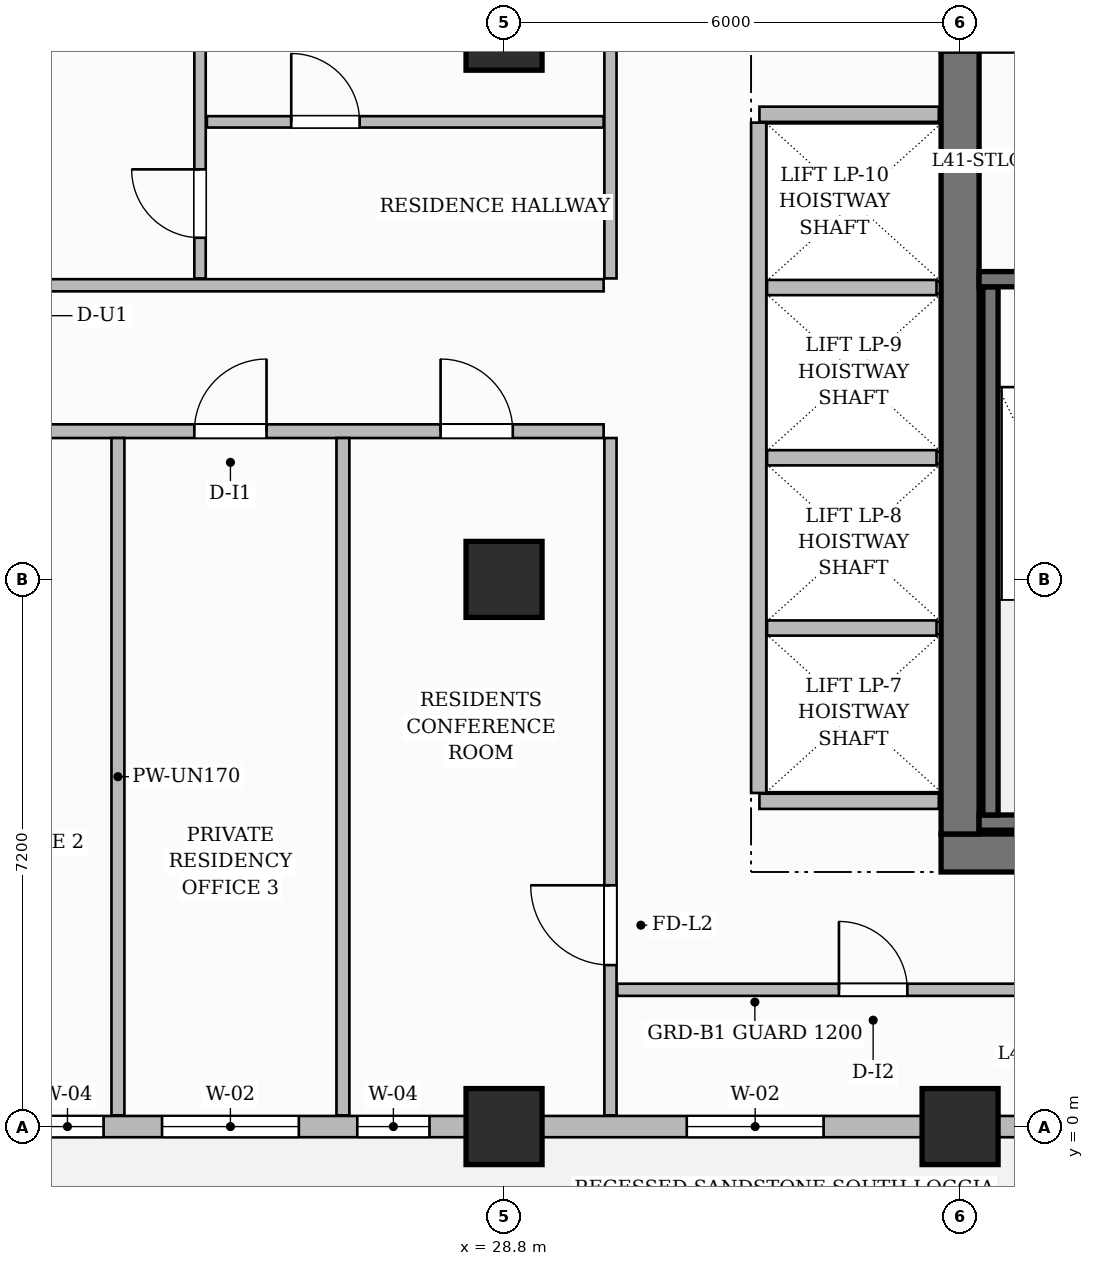
"""IFC4 building model, lengths in metres.
Left out: names, types, materials, properties, quantities, classifications, styles, units other than length and angle.
Written with IfcOpenShell. Run it as: python <this file> out.ifc"""

import sys

from ifc_helpers import new_model, si_unit, direction, frame, frame_2d, origin, origin_2d, place, context, subcontext, project, spatial, rectangle, extrude, source, transform, mapped, element, fill, save


model = new_model("IFC4")
c1 = context("Model", 3, precision=1e-05, world=origin(), true_north=direction((0.0, 1.0)))
c2 = subcontext(c1, "Body", "Model", "MODEL_VIEW")
j1 = project(units=[si_unit("LENGTHUNIT", "METRE"), si_unit("PLANEANGLEUNIT", "RADIAN")], contexts=[c1])
p1 = place(None, origin())
s1 = spatial("IfcSite", under=j1, at=p1, CompositionType="ELEMENT")
p2 = place(p1, origin())
s2 = spatial("IfcBuilding", under=s1, at=p2, CompositionType="ELEMENT")
p3 = place(p2, frame((0.0, 0.0, 165.7)))
s3 = spatial("IfcBuildingStorey", under=s2, at=p3, CompositionType="ELEMENT", Elevation=165.7)
p4 = place(p3, frame((34.55, 3.6, 0.0), z_axis=(0.0, 0.0, 1.0), x_axis=(1.0, 0.0, 0.0)))
e1 = element("IfcWall", 1, at=p4, inside=s3, PredefinedType="SHEAR", context=c2, shape_type="SweptSolid", body=[
    extrude(rectangle(XDim=15.5, YDim=0.5, at=frame_2d((7.75, 0.0))), origin(), (0.0, 0.0, 1.0), 3.85),
])
p5 = place(p4, frame((4.8, 0.0, 0.0)))
e2 = element("IfcOpeningElement", 2, at=p5, cuts=e1, PredefinedType="OPENING", context=c2, shape_type="SweptSolid", body=[
    extrude(rectangle(XDim=0.9, YDim=2.1, at=frame_2d((0.45, 1.05))), frame((0.0, 0.26, 0.0), z_axis=(0.0, -1.0, 0.0), x_axis=(1.0, 0.0, 0.0)), (0.0, 0.0, 1.0), 0.52),
])
p6 = place(p4, frame((7.22, 0.0, 0.0)))
e3 = element("IfcOpeningElement", 3, at=p6, cuts=e1, PredefinedType="OPENING", context=c2, shape_type="SweptSolid", body=[
    extrude(rectangle(XDim=0.9, YDim=2.1, at=frame_2d((0.45, 1.05))), frame((0.0, 0.26, 0.0), z_axis=(0.0, -1.0, 0.0), x_axis=(1.0, 0.0, 0.0)), (0.0, 0.0, 1.0), 0.52),
])
p7 = place(p3, frame((34.8, 3.85, 0.0), z_axis=(0.0, 0.0, 1.0), x_axis=(0.0, 1.0, 0.0)))
e4 = element("IfcWall", 4, at=p7, inside=s3, PredefinedType="SHEAR", context=c2, shape_type="SweptSolid", body=[
    extrude(rectangle(XDim=10.3, YDim=0.5, at=frame_2d((5.15, 0.0))), origin(), (0.0, 0.0, 1.0), 3.85),
])
m1 = source(origin(), c2, "Body", "SweptSolid", [
    extrude(rectangle(XDim=1.0, YDim=1.0, at=origin_2d()), origin(), (0.0, 0.0, 1.0), 3.85),
])
for number, where, z_axis, x_axis in (
    (5, (28.8, 0.0, 0.0), (0.0, 0.0, 1.0), (1.0, 0.0, 0.0)),
    (6, (28.8, 7.2, 0.0), (0.0, 0.0, 1.0), (1.0, 0.0, 0.0)),
    (7, (28.8, 14.4, 0.0), (0.0, 0.0, 1.0), (1.0, 0.0, 0.0)),
    (8, (34.8, 0.0, 0.0), (0.0, 0.0, 1.0), (1.0, 0.0, 0.0)),
):
    element("IfcColumn", number, at=place(p3, frame(where, z_axis=z_axis, x_axis=x_axis)), inside=s3, PredefinedType="COLUMN", context=c2, shape_type="MappedRepresentation", body=[
        mapped(m1, transform((0.0, 0.0, 0.0), scale=1.0)),
    ])
p8 = place(p3, frame((35.05, 4.0, 0.0), z_axis=(0.0, 0.0, 1.0), x_axis=(1.0, 0.0, 0.0)))
e9 = element("IfcWall", 9, at=p8, inside=s3, PredefinedType="SHEAR", context=c2, shape_type="SweptSolid", body=[
    extrude(rectangle(XDim=3.19, YDim=0.2, at=frame_2d((1.595, 0.0))), origin(), (0.0, 0.0, 1.0), 3.85),
])
p9 = place(p3, frame((35.2, 4.1, 0.0), z_axis=(0.0, 0.0, 1.0), x_axis=(0.0, 1.0, 0.0)))
e10 = element("IfcWall", 10, at=p9, inside=s3, PredefinedType="SHEAR", context=c2, shape_type="SweptSolid", body=[
    extrude(rectangle(XDim=6.95, YDim=0.2, at=frame_2d((3.475, 0.0))), origin(), (0.0, 0.0, 1.0), 3.85),
])
p10 = place(p3, frame((35.05, 11.15, 0.0), z_axis=(0.0, 0.0, 1.0), x_axis=(1.0, 0.0, 0.0)))
e11 = element("IfcWall", 11, at=p10, inside=s3, PredefinedType="SHEAR", context=c2, shape_type="SweptSolid", body=[
    extrude(rectangle(XDim=3.19, YDim=0.2, at=frame_2d((1.595, 0.0))), origin(), (0.0, 0.0, 1.0), 3.85),
])
p11 = place(p10, frame((1.095, 0.0, 0.0)))
e12 = element("IfcOpeningElement", 12, at=p11, cuts=e11, PredefinedType="OPENING", context=c2, shape_type="SweptSolid", body=[
    extrude(rectangle(XDim=1.05, YDim=2.2, at=frame_2d((0.525, 1.1))), frame((0.0, 0.11, 0.0), z_axis=(0.0, -1.0, 0.0), x_axis=(1.0, 0.0, 0.0)), (0.0, 0.0, 1.0), 0.22),
])
for number, where, z_axis, x_axis in (
    (13, (32.16, 4.28, 0.0), (0.0, 0.0, 1.0), (1.0, 0.0, 0.0)),
    (14, (32.16, 13.32, 0.0), (0.0, 0.0, 1.0), (1.0, 0.0, 0.0)),
):
    element("IfcWall", number, at=place(p3, frame(where, z_axis=z_axis, x_axis=x_axis)), inside=s3, PredefinedType="PARTITIONING", context=c2, shape_type="SweptSolid", body=[
        extrude(rectangle(XDim=2.36, YDim=0.2, at=frame_2d((1.18, 0.0))), origin(), (0.0, 0.0, 1.0), 3.6),
    ])
p12 = place(p3, frame((32.15, 4.39, 0.0), z_axis=(0.0, 0.0, 1.0), x_axis=(0.0, 1.0, 0.0)))
e15 = element("IfcWall", 15, at=p12, inside=s3, PredefinedType="PARTITIONING", context=c2, shape_type="SweptSolid", body=[
    extrude(rectangle(XDim=8.82, YDim=0.2, at=frame_2d((4.41, 0.0))), origin(), (0.0, 0.0, 1.0), 3.6),
])
for number, where, z_axis, x_axis in (
    (16, (32.26, 6.56, 0.0), (0.0, 0.0, 1.0), (1.0, 0.0, 0.0)),
    (17, (32.26, 8.8, 0.0), (0.0, 0.0, 1.0), (1.0, 0.0, 0.0)),
    (18, (32.26, 11.04, 0.0), (0.0, 0.0, 1.0), (1.0, 0.0, 0.0)),
):
    element("IfcWall", number, at=place(p3, frame(where, z_axis=z_axis, x_axis=x_axis)), inside=s3, PredefinedType="PARTITIONING", context=c2, shape_type="SweptSolid", body=[
        extrude(rectangle(XDim=2.23, YDim=0.2, at=frame_2d((1.115, 0.0))), origin(), (0.0, 0.0, 1.0), 3.6),
    ])
p13 = place(p3, frame((14.548, 9.15, 0.0), z_axis=(0.0, 0.0, 1.0), x_axis=(1.0, 0.0, 0.0)))
e19 = element("IfcWall", 19, at=p13, inside=s3, PredefinedType="PARTITIONING", context=c2, shape_type="SweptSolid", body=[
    extrude(rectangle(XDim=15.562, YDim=0.18, at=frame_2d((7.781, 0.0))), origin(), (0.0, 0.0, 1.0), 3.6),
])
p14 = place(p13, frame((1.477, 0.0, 0.0)))
e20 = element("IfcOpeningElement", 20, at=p14, cuts=e19, PredefinedType="OPENING", context=c2, shape_type="SweptSolid", body=[
    extrude(rectangle(XDim=0.95, YDim=2.15, at=frame_2d((0.475, 1.075))), frame((0.0, 0.1, 0.0), z_axis=(0.0, -1.0, 0.0), x_axis=(1.0, 0.0, 0.0)), (0.0, 0.0, 1.0), 0.2),
])
p15 = place(p13, frame((6.137, 0.0, 0.0)))
e21 = element("IfcOpeningElement", 21, at=p15, cuts=e19, PredefinedType="OPENING", context=c2, shape_type="SweptSolid", body=[
    extrude(rectangle(XDim=0.95, YDim=2.15, at=frame_2d((0.475, 1.075))), frame((0.0, 0.1, 0.0), z_axis=(0.0, -1.0, 0.0), x_axis=(1.0, 0.0, 0.0)), (0.0, 0.0, 1.0), 0.2),
])
p16 = place(p13, frame((10.177, 0.0, 0.0)))
e22 = element("IfcOpeningElement", 22, at=p16, cuts=e19, PredefinedType="OPENING", context=c2, shape_type="SweptSolid", body=[
    extrude(rectangle(XDim=0.95, YDim=2.15, at=frame_2d((0.475, 1.075))), frame((0.0, 0.1, 0.0), z_axis=(0.0, -1.0, 0.0), x_axis=(1.0, 0.0, 0.0)), (0.0, 0.0, 1.0), 0.2),
])
p17 = place(p13, frame((13.417, 0.0, 0.0)))
e23 = element("IfcOpeningElement", 23, at=p17, cuts=e19, PredefinedType="OPENING", context=c2, shape_type="SweptSolid", body=[
    extrude(rectangle(XDim=0.95, YDim=2.15, at=frame_2d((0.475, 1.075))), frame((0.0, 0.1, 0.0), z_axis=(0.0, -1.0, 0.0), x_axis=(1.0, 0.0, 0.0)), (0.0, 0.0, 1.0), 0.2),
])
p18 = place(p3, frame((14.548, 11.07, 0.0), z_axis=(0.0, 0.0, 1.0), x_axis=(1.0, 0.0, 0.0)))
e24 = element("IfcWall", 24, at=p18, inside=s3, PredefinedType="PARTITIONING", context=c2, shape_type="SweptSolid", body=[
    extrude(rectangle(XDim=15.562, YDim=0.16, at=frame_2d((7.781, 0.0))), origin(), (0.0, 0.0, 1.0), 3.6),
])
p19 = place(p18, frame((7.142, 0.0, 0.0)))
e25 = element("IfcOpeningElement", 25, at=p19, cuts=e24, PredefinedType="OPENING", context=c2, shape_type="SweptSolid", body=[
    extrude(rectangle(XDim=1.05, YDim=2.25, at=frame_2d((0.525, 1.125))), frame((0.0, 0.09, 0.0), z_axis=(0.0, -1.0, 0.0), x_axis=(1.0, 0.0, 0.0)), (0.0, 0.0, 1.0), 0.18),
])
p20 = place(p3, frame((30.2, 11.16, 0.0), z_axis=(0.0, 0.0, 1.0), x_axis=(0.0, 1.0, 0.0)))
e26 = element("IfcWall", 26, at=p20, inside=s3, PredefinedType="PARTITIONING", context=c2, shape_type="SweptSolid", body=[
    extrude(rectangle(XDim=6.3, YDim=0.16, at=frame_2d((3.15, 0.0))), origin(), (0.0, 0.0, 1.0), 3.6),
])
p21 = place(p3, frame((30.2, 0.148, 0.0), z_axis=(0.0, 0.0, 1.0), x_axis=(0.0, 1.0, 0.0)))
e27 = element("IfcWall", 27, at=p21, inside=s3, PredefinedType="PARTITIONING", context=c2, shape_type="SweptSolid", body=[
    extrude(rectangle(XDim=8.912, YDim=0.16, at=frame_2d((4.456, 0.0))), origin(), (0.0, 0.0, 1.0), 3.6),
])
p22 = place(p21, frame((1.977, 0.0, 0.0)))
e28 = element("IfcOpeningElement", 28, at=p22, cuts=e27, PredefinedType="OPENING", context=c2, shape_type="SweptSolid", body=[
    extrude(rectangle(XDim=1.05, YDim=2.15, at=frame_2d((0.525, 1.075))), frame((0.0, 0.09, 0.0), z_axis=(0.0, -1.0, 0.0), x_axis=(1.0, 0.0, 0.0)), (0.0, 0.0, 1.0), 0.18),
])
p23 = place(p3, frame((30.29, 1.8, 0.0), z_axis=(0.0, 0.0, 1.0), x_axis=(1.0, 0.0, 0.0)))
e29 = element("IfcWall", 29, at=p23, inside=s3, PredefinedType="PARTITIONING", context=c2, shape_type="SweptSolid", body=[
    extrude(rectangle(XDim=19.37, YDim=0.16, at=frame_2d((9.685, 0.0))), origin(), (0.0, 0.0, 1.0), 3.6),
])
p24 = place(p23, frame((2.916, 0.0, 0.0)))
e30 = element("IfcOpeningElement", 30, at=p24, cuts=e29, PredefinedType="OPENING", context=c2, shape_type="SweptSolid", body=[
    extrude(rectangle(XDim=0.9, YDim=2.15, at=frame_2d((0.45, 1.075))), frame((0.0, 0.09, 0.0), z_axis=(0.0, -1.0, 0.0), x_axis=(1.0, 0.0, 0.0)), (0.0, 0.0, 1.0), 0.18),
])
p25 = place(p23, frame((9.66, 0.0, 0.0)))
e31 = element("IfcOpeningElement", 31, at=p25, cuts=e29, PredefinedType="OPENING", context=c2, shape_type="SweptSolid", body=[
    extrude(rectangle(XDim=0.9, YDim=2.15, at=frame_2d((0.45, 1.075))), frame((0.0, 0.09, 0.0), z_axis=(0.0, -1.0, 0.0), x_axis=(1.0, 0.0, 0.0)), (0.0, 0.0, 1.0), 0.18),
])
p26 = place(p23, frame((15.86, 0.0, 0.0)))
e32 = element("IfcOpeningElement", 32, at=p26, cuts=e29, PredefinedType="OPENING", context=c2, shape_type="SweptSolid", body=[
    extrude(rectangle(XDim=0.9, YDim=2.15, at=frame_2d((0.45, 1.075))), frame((0.0, 0.09, 0.0), z_axis=(0.0, -1.0, 0.0), x_axis=(1.0, 0.0, 0.0)), (0.0, 0.0, 1.0), 0.18),
])
for number, where, z_axis, x_axis in (
    (33, (23.72, 0.148, 0.0), (0.0, 0.0, 1.0), (0.0, 1.0, 0.0)),
    (34, (26.68, 0.148, 0.0), (0.0, 0.0, 1.0), (0.0, 1.0, 0.0)),
):
    element("IfcWall", number, at=place(p3, frame(where, z_axis=z_axis, x_axis=x_axis)), inside=s3, PredefinedType="PARTITIONING", context=c2, shape_type="SweptSolid", body=[
        extrude(rectangle(XDim=8.912, YDim=0.17, at=frame_2d((4.456, 0.0))), origin(), (0.0, 0.0, 1.0), 3.6),
    ])
p27 = place(p3, frame((24.8, 11.16, 0.0), z_axis=(0.0, 0.0, 1.0), x_axis=(0.0, 1.0, 0.0)))
e35 = element("IfcWall", 35, at=p27, inside=s3, PredefinedType="PARTITIONING", context=c2, shape_type="SweptSolid", body=[
    extrude(rectangle(XDim=8.6, YDim=0.15, at=frame_2d((4.3, 0.0))), origin(), (0.0, 0.0, 1.0), 3.6),
])
p28 = place(p27, frame((0.535, 0.0, 0.0)))
e36 = element("IfcOpeningElement", 36, at=p28, cuts=e35, PredefinedType="OPENING", context=c2, shape_type="SweptSolid", body=[
    extrude(rectangle(XDim=0.9, YDim=2.15, at=frame_2d((0.45, 1.075))), frame((0.0, 0.085, 0.0), z_axis=(0.0, -1.0, 0.0), x_axis=(1.0, 0.0, 0.0)), (0.0, 0.0, 1.0), 0.17),
])
p29 = place(p3, frame((24.89, 13.22, 0.0), z_axis=(0.0, 0.0, 1.0), x_axis=(1.0, 0.0, 0.0)))
e37 = element("IfcWall", 37, at=p29, inside=s3, PredefinedType="PARTITIONING", context=c2, shape_type="SweptSolid", body=[
    extrude(rectangle(XDim=5.22, YDim=0.15, at=frame_2d((2.61, 0.0))), origin(), (0.0, 0.0, 1.0), 3.6),
])
p30 = place(p29, frame((1.11, 0.0, 0.0)))
e38 = element("IfcOpeningElement", 38, at=p30, cuts=e37, PredefinedType="OPENING", context=c2, shape_type="SweptSolid", body=[
    extrude(rectangle(XDim=0.9, YDim=2.15, at=frame_2d((0.45, 1.075))), frame((0.0, 0.085, 0.0), z_axis=(0.0, -1.0, 0.0), x_axis=(1.0, 0.0, 0.0)), (0.0, 0.0, 1.0), 0.17),
])
p31 = place(p3, frame((14.4, 0.0, 0.0), z_axis=(0.0, 0.0, 1.0), x_axis=(1.0, 0.0, 0.0)))
e39 = element("IfcWall", 39, at=p31, inside=s3, PredefinedType="SOLIDWALL", context=c2, shape_type="SweptSolid", body=[
    extrude(rectangle(XDim=35.4, YDim=0.28, at=frame_2d((17.7, 0.0))), origin(), (0.0, 0.0, 1.0), 3.085),
])
p32 = place(p31, frame((0.85, 0.0, 0.0)))
e40 = element("IfcOpeningElement", 40, at=p32, cuts=e39, PredefinedType="OPENING", context=c2, shape_type="SweptSolid", body=[
    extrude(rectangle(XDim=1.2, YDim=2.2, at=frame_2d((0.6, 1.1))), frame((0.0, 0.15, 0.0), z_axis=(0.0, -1.0, 0.0), x_axis=(1.0, 0.0, 0.0)), (0.0, 0.0, 1.0), 0.3),
])
p33 = place(p31, frame((2.696, 0.0, 0.8)))
e41 = element("IfcOpeningElement", 41, at=p33, cuts=e39, PredefinedType="OPENING", context=c2, shape_type="SweptSolid", body=[
    extrude(rectangle(XDim=1.15, YDim=1.8, at=frame_2d((0.575, 0.9))), frame((0.0, 0.15, 0.0), z_axis=(0.0, -1.0, 0.0), x_axis=(1.0, 0.0, 0.0)), (0.0, 0.0, 1.0), 0.3),
])
p34 = place(p31, frame((4.604, 0.0, 0.8)))
e42 = element("IfcOpeningElement", 42, at=p34, cuts=e39, PredefinedType="OPENING", context=c2, shape_type="SweptSolid", body=[
    extrude(rectangle(XDim=1.4, YDim=1.85, at=frame_2d((0.7, 0.925))), frame((0.0, 0.15, 0.0), z_axis=(0.0, -1.0, 0.0), x_axis=(1.0, 0.0, 0.0)), (0.0, 0.0, 1.0), 0.3),
])
p35 = place(p31, frame((8.181, 0.0, 0.8)))
e43 = element("IfcOpeningElement", 43, at=p35, cuts=e39, PredefinedType="OPENING", context=c2, shape_type="SweptSolid", body=[
    extrude(rectangle(XDim=0.95, YDim=1.75, at=frame_2d((0.475, 0.875))), frame((0.0, 0.15, 0.0), z_axis=(0.0, -1.0, 0.0), x_axis=(1.0, 0.0, 0.0)), (0.0, 0.0, 1.0), 0.3),
])
p36 = place(p31, frame((9.9, 0.0, 0.8)))
e44 = element("IfcOpeningElement", 44, at=p36, cuts=e39, PredefinedType="OPENING", context=c2, shape_type="SweptSolid", body=[
    extrude(rectangle(XDim=1.8, YDim=1.85, at=frame_2d((0.9, 0.925))), frame((0.0, 0.15, 0.0), z_axis=(0.0, -1.0, 0.0), x_axis=(1.0, 0.0, 0.0)), (0.0, 0.0, 1.0), 0.3),
])
p37 = place(p31, frame((12.469, 0.0, 0.8)))
e45 = element("IfcOpeningElement", 45, at=p37, cuts=e39, PredefinedType="OPENING", context=c2, shape_type="SweptSolid", body=[
    extrude(rectangle(XDim=0.95, YDim=1.75, at=frame_2d((0.475, 0.875))), frame((0.0, 0.15, 0.0), z_axis=(0.0, -1.0, 0.0), x_axis=(1.0, 0.0, 0.0)), (0.0, 0.0, 1.0), 0.3),
])
p38 = place(p31, frame((16.804, 0.0, 0.8)))
e46 = element("IfcOpeningElement", 46, at=p38, cuts=e39, PredefinedType="OPENING", context=c2, shape_type="SweptSolid", body=[
    extrude(rectangle(XDim=1.8, YDim=1.85, at=frame_2d((0.9, 0.925))), frame((0.0, 0.15, 0.0), z_axis=(0.0, -1.0, 0.0), x_axis=(1.0, 0.0, 0.0)), (0.0, 0.0, 1.0), 0.3),
])
p39 = place(p31, frame((21.521, 0.0, 0.8)))
e47 = element("IfcOpeningElement", 47, at=p39, cuts=e39, PredefinedType="OPENING", context=c2, shape_type="SweptSolid", body=[
    extrude(rectangle(XDim=0.95, YDim=1.75, at=frame_2d((0.475, 0.875))), frame((0.0, 0.15, 0.0), z_axis=(0.0, -1.0, 0.0), x_axis=(1.0, 0.0, 0.0)), (0.0, 0.0, 1.0), 0.3),
])
p40 = place(p31, frame((23.904, 0.0, 0.8)))
e48 = element("IfcOpeningElement", 48, at=p40, cuts=e39, PredefinedType="OPENING", context=c2, shape_type="SweptSolid", body=[
    extrude(rectangle(XDim=1.8, YDim=1.85, at=frame_2d((0.9, 0.925))), frame((0.0, 0.15, 0.0), z_axis=(0.0, -1.0, 0.0), x_axis=(1.0, 0.0, 0.0)), (0.0, 0.0, 1.0), 0.3),
])
p41 = place(p31, frame((29.681, 0.0, 0.8)))
e49 = element("IfcOpeningElement", 49, at=p41, cuts=e39, PredefinedType="OPENING", context=c2, shape_type="SweptSolid", body=[
    extrude(rectangle(XDim=1.8, YDim=1.85, at=frame_2d((0.9, 0.925))), frame((0.0, 0.15, 0.0), z_axis=(0.0, -1.0, 0.0), x_axis=(1.0, 0.0, 0.0)), (0.0, 0.0, 1.0), 0.3),
])
p42 = place(p31, frame((32.327, 0.0, 0.8)))
e50 = element("IfcOpeningElement", 50, at=p42, cuts=e39, PredefinedType="OPENING", context=c2, shape_type="SweptSolid", body=[
    extrude(rectangle(XDim=1.8, YDim=1.85, at=frame_2d((0.9, 0.925))), frame((0.0, 0.15, 0.0), z_axis=(0.0, -1.0, 0.0), x_axis=(1.0, 0.0, 0.0)), (0.0, 0.0, 1.0), 0.3),
])
m2 = source(origin(), c2, "Body", "SweptSolid", [
    extrude(rectangle(XDim=1.05, YDim=2.15, at=frame_2d((0.525, 1.075))), frame((0.0, 0.025, 0.0), z_axis=(0.0, -1.0, 0.0), x_axis=(1.0, 0.0, 0.0)), (0.0, 0.0, 1.0), 0.05),
])
p43 = place(p22, origin())
e51 = element("IfcDoor", 51, at=p43, inside=s3, OperationType="SINGLE_SWING_RIGHT", PredefinedType="DOOR", context=c2, shape_type="MappedRepresentation", body=[
    mapped(m2, transform((0.0, 0.0, 0.0), scale=1.0)),
])
fill(e28, e51)
m3 = source(origin(), c2, "Body", "SweptSolid", [
    extrude(rectangle(XDim=0.9, YDim=2.15, at=frame_2d((0.45, 1.075))), frame((0.0, 0.025, 0.0), z_axis=(0.0, -1.0, 0.0), x_axis=(1.0, 0.0, 0.0)), (0.0, 0.0, 1.0), 0.05),
])
p44 = place(p24, origin())
e52 = element("IfcDoor", 52, at=p44, inside=s3, OperationType="SINGLE_SWING_LEFT", PredefinedType="DOOR", context=c2, shape_type="MappedRepresentation", body=[
    mapped(m3, transform((0.0, 0.0, 0.0), scale=1.0)),
])
fill(e30, e52)
m4 = source(origin(), c2, "Body", "SweptSolid", [
    extrude(rectangle(XDim=0.95, YDim=2.15, at=frame_2d((0.475, 1.075))), frame((0.0, 0.025, 0.0), z_axis=(0.0, -1.0, 0.0), x_axis=(1.0, 0.0, 0.0)), (0.0, 0.0, 1.0), 0.05),
])
p45 = place(p16, origin())
e53 = element("IfcDoor", 53, at=p45, inside=s3, OperationType="SINGLE_SWING_RIGHT", PredefinedType="DOOR", context=c2, shape_type="MappedRepresentation", body=[
    mapped(m4, transform((0.0, 0.0, 0.0), scale=1.0)),
])
fill(e22, e53)
p46 = place(p17, origin())
e54 = element("IfcDoor", 54, at=p46, inside=s3, OperationType="SINGLE_SWING_LEFT", PredefinedType="DOOR", context=c2, shape_type="MappedRepresentation", body=[
    mapped(m4, transform((0.0, 0.0, 0.0), scale=1.0)),
])
fill(e23, e54)
p47 = place(p28, origin())
e55 = element("IfcDoor", 55, at=p47, inside=s3, OperationType="SINGLE_SWING_RIGHT", PredefinedType="DOOR", context=c2, shape_type="MappedRepresentation", body=[
    mapped(m3, transform((0.0, 0.0, 0.0), scale=1.0)),
])
fill(e36, e55)
p48 = place(p30, origin())
e56 = element("IfcDoor", 56, at=p48, inside=s3, OperationType="SINGLE_SWING_LEFT", PredefinedType="DOOR", context=c2, shape_type="MappedRepresentation", body=[
    mapped(m3, transform((0.0, 0.0, 0.0), scale=1.0)),
])
fill(e38, e56)
m5 = source(origin(), c2, "Body", "SweptSolid", [
    extrude(rectangle(XDim=0.95, YDim=1.75, at=frame_2d((0.475, 0.875))), frame((0.0, 0.03, 0.0), z_axis=(0.0, -1.0, 0.0), x_axis=(1.0, 0.0, 0.0)), (0.0, 0.0, 1.0), 0.06),
])
p49 = place(p35, origin())
e57 = element("IfcWindow", 57, at=p49, inside=s3, PartitioningType="SINGLE_PANEL", PredefinedType="WINDOW", context=c2, shape_type="MappedRepresentation", body=[
    mapped(m5, transform((0.0, 0.0, 0.0), scale=1.0)),
])
fill(e43, e57)
m6 = source(origin(), c2, "Body", "SweptSolid", [
    extrude(rectangle(XDim=1.8, YDim=1.85, at=frame_2d((0.9, 0.925))), frame((0.0, 0.03, 0.0), z_axis=(0.0, -1.0, 0.0), x_axis=(1.0, 0.0, 0.0)), (0.0, 0.0, 1.0), 0.06),
])
p50 = place(p36, origin())
e58 = element("IfcWindow", 58, at=p50, inside=s3, PartitioningType="DOUBLE_PANEL_VERTICAL", PredefinedType="WINDOW", context=c2, shape_type="MappedRepresentation", body=[
    mapped(m6, transform((0.0, 0.0, 0.0), scale=1.0)),
])
fill(e44, e58)
p51 = place(p37, origin())
e59 = element("IfcWindow", 59, at=p51, inside=s3, PartitioningType="SINGLE_PANEL", PredefinedType="WINDOW", context=c2, shape_type="MappedRepresentation", body=[
    mapped(m5, transform((0.0, 0.0, 0.0), scale=1.0)),
])
fill(e45, e59)
p52 = place(p38, origin())
e60 = element("IfcWindow", 60, at=p52, inside=s3, PartitioningType="DOUBLE_PANEL_VERTICAL", PredefinedType="WINDOW", context=c2, shape_type="MappedRepresentation", body=[
    mapped(m6, transform((0.0, 0.0, 0.0), scale=1.0)),
])
fill(e46, e60)
save(model, sys.argv[1])
